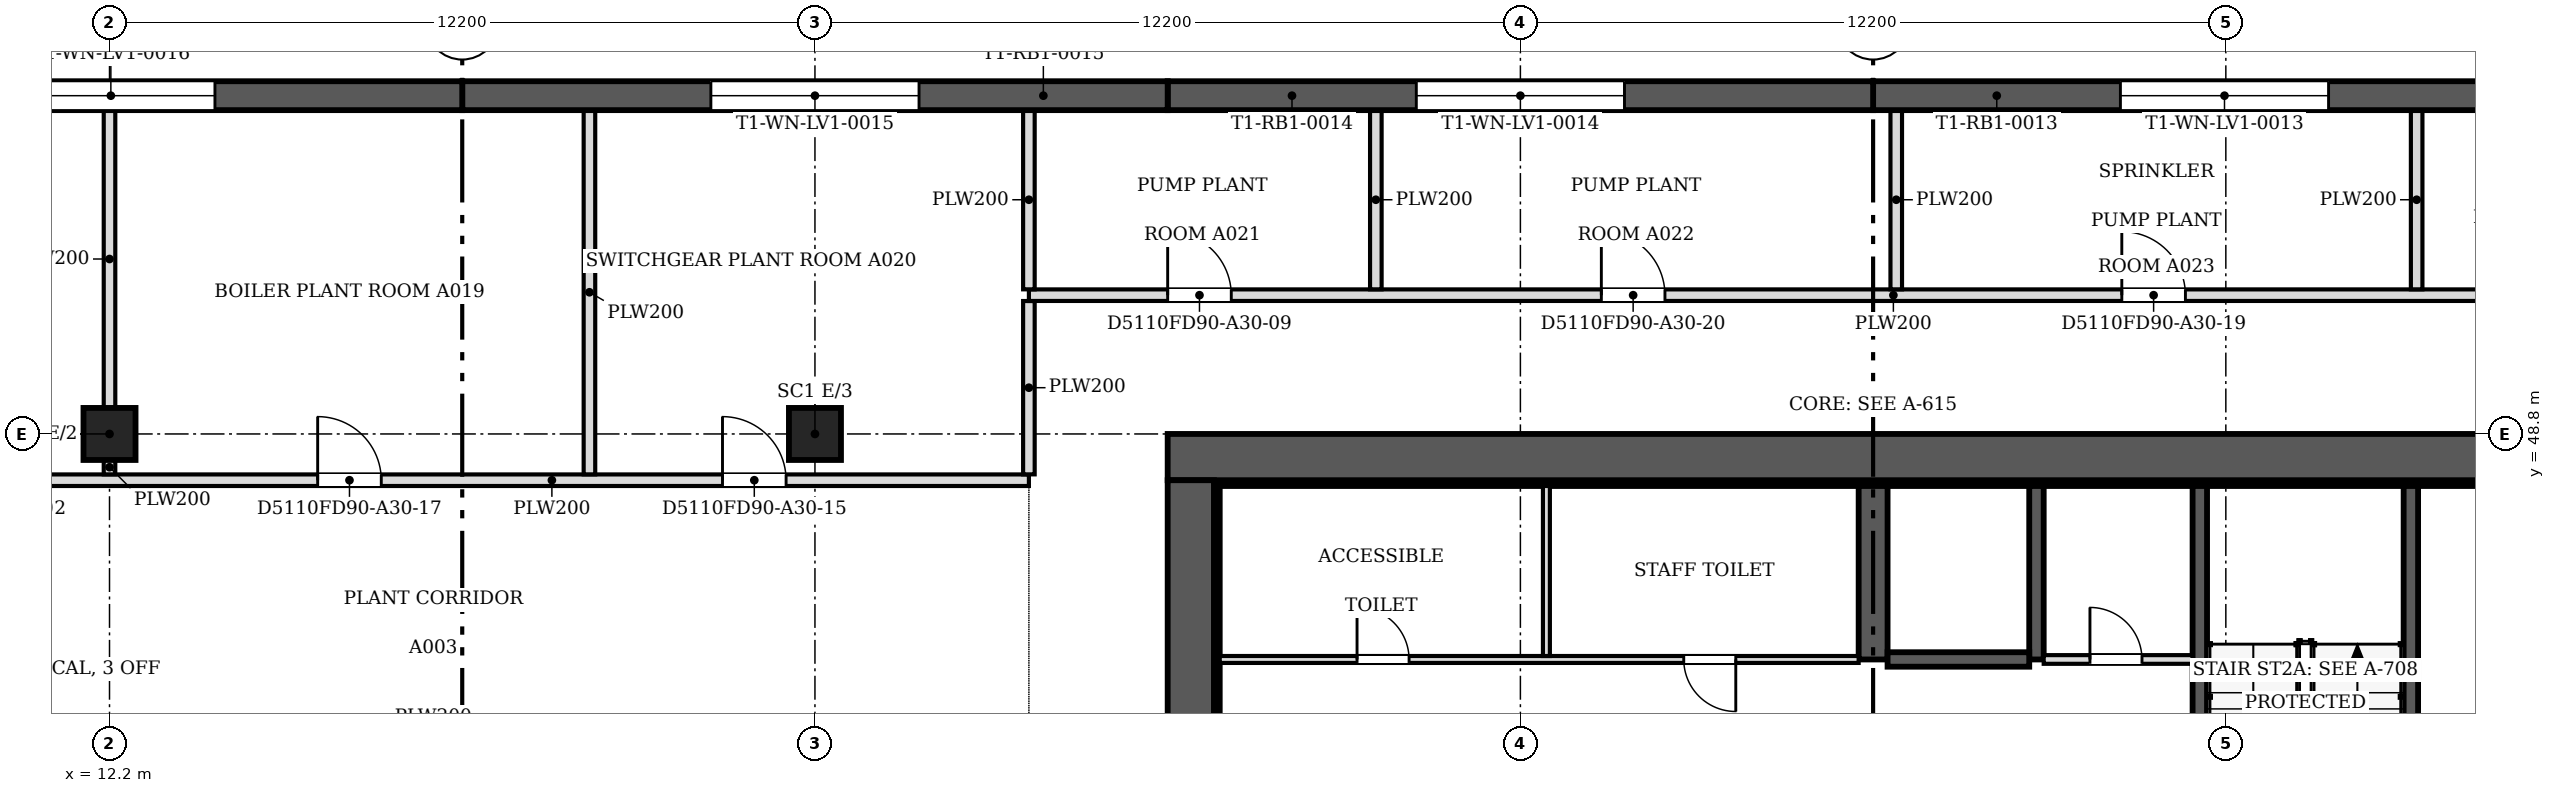
"""IFC4 building model, lengths in metres.
Left out: names, types, materials, properties, quantities, classifications, styles, units other than length and angle.
Written with IfcOpenShell. Run it as: python <this file> out.ifc"""

import sys

from ifc_helpers import new_model, si_unit, direction, frame, frame_2d, origin, origin_2d, place, context, subcontext, project, spatial, polyline, rectangle, outline, extrude, faceted_brep, source, transform, mapped, element, fill, save


model = new_model("IFC4")
c1 = context("Model", 3, precision=1e-05, world=origin(), true_north=direction((0.0, 1.0)))
c2 = subcontext(c1, "Body", "Model", "MODEL_VIEW")
j1 = project(units=[si_unit("LENGTHUNIT", "METRE"), si_unit("PLANEANGLEUNIT", "RADIAN")], contexts=[c1])
p1 = place(None, origin())
s1 = spatial("IfcSite", under=j1, at=p1, CompositionType="ELEMENT")
p2 = place(p1, origin())
s2 = spatial("IfcBuilding", under=s1, at=p2, CompositionType="ELEMENT")
p3 = place(p2, frame((0.0, 0.0, 63.8)))
s3 = spatial("IfcBuildingStorey", under=s2, at=p3, CompositionType="ELEMENT", Elevation=63.8)
for number, where, z_axis, x_axis in (
    (1, (12.2, 48.8, 0.0), (0.0, 0.0, 1.0), (1.0, 0.0, 0.0)),
    (2, (24.4, 48.8, 0.0), (0.0, 0.0, 1.0), (1.0, 0.0, 0.0)),
):
    element("IfcColumn", number, at=place(p3, frame(where, z_axis=z_axis, x_axis=x_axis)), inside=s3, PredefinedType="COLUMN", context=c2, shape_type="SweptSolid", body=[
        extrude(rectangle(XDim=0.9, YDim=0.9, at=origin_2d()), origin(), (0.0, 0.0, 1.0), 4.6),
    ])
m1 = source(origin(), c2, "Body", "Brep", [
    faceted_brep([(0.0, -0.25, 0.0), (12.154, -0.25, 0.0), (12.154, -0.25, 4.8), (0.0, -0.25, 4.8), (0.047, 0.25, 4.8), (12.154, 0.25, 4.8), (12.154, 0.25, 0.0), (0.047, 0.25, 0.0), (0.0, 0.0, 0.0), (0.0, 0.0, 4.8)], [[[0, 1, 2, 3]], [[4, 5, 6, 7]], [[7, 6, 1, 0, 8]], [[5, 4, 9, 3, 2]], [[8, 0, 3, 9]], [[7, 8, 9, 4]], [[1, 6, 5, 2]]]),
])
p4 = place(p3, frame((54.854, 54.65, 0.0), z_axis=(0.0, 0.0, 1.0), x_axis=(-1.0, 0.0, 0.0)))
e3 = element("IfcWall", 3, at=p4, inside=s3, PredefinedType="SOLIDWALL", context=c2, shape_type="MappedRepresentation", body=[
    mapped(m1, transform((0.0, 0.0, 0.0), scale=1.0)),
])
m2 = source(origin(), c2, "Body", "SweptSolid", [
    extrude(outline(polyline([(4.277, 0.8), (7.877, 0.8), (7.877, 4.0), (4.277, 4.0), (4.277, 0.8)])), frame((0.0, 0.26, 0.0), z_axis=(0.0, -1.0, 0.0), x_axis=(1.0, 0.0, 0.0)), (0.0, 0.0, 1.0), 0.52),
])
p5 = place(p4, origin())
e4 = element("IfcOpeningElement", 4, at=p5, cuts=e3, PredefinedType="OPENING", context=c2, shape_type="MappedRepresentation", body=[
    mapped(m2, transform((0.0, 0.0, 0.0), scale=1.0)),
])
m3 = source(origin(), c2, "Body", "SweptSolid", [
    extrude(outline(polyline([(0.0, 0.0), (12.2, 0.0), (12.2, 4.8), (0.0, 4.8), (0.0, 0.0)])), frame((0.0, 0.25, 0.0), z_axis=(0.0, -1.0, 0.0), x_axis=(1.0, 0.0, 0.0)), (0.0, 0.0, 1.0), 0.5),
])
p6 = place(p3, frame((42.7, 54.65, 0.0), z_axis=(0.0, 0.0, 1.0), x_axis=(-1.0, 0.0, 0.0)))
e5 = element("IfcWall", 5, at=p6, inside=s3, PredefinedType="SOLIDWALL", context=c2, shape_type="MappedRepresentation", body=[
    mapped(m3, transform((0.0, 0.0, 0.0), scale=1.0)),
])
m4 = source(origin(), c2, "Body", "SweptSolid", [
    extrude(outline(polyline([(4.3, 0.8), (7.9, 0.8), (7.9, 4.0), (4.3, 4.0), (4.3, 0.8)])), frame((0.0, 0.26, 0.0), z_axis=(0.0, -1.0, 0.0), x_axis=(1.0, 0.0, 0.0)), (0.0, 0.0, 1.0), 0.52),
])
p7 = place(p6, origin())
e6 = element("IfcOpeningElement", 6, at=p7, cuts=e5, PredefinedType="OPENING", context=c2, shape_type="MappedRepresentation", body=[
    mapped(m4, transform((0.0, 0.0, 0.0), scale=1.0)),
])
p8 = place(p3, frame((30.5, 54.65, 0.0), z_axis=(0.0, 0.0, 1.0), x_axis=(-1.0, 0.0, 0.0)))
e7 = element("IfcWall", 7, at=p8, inside=s3, PredefinedType="SOLIDWALL", context=c2, shape_type="MappedRepresentation", body=[
    mapped(m3, transform((0.0, 0.0, 0.0), scale=1.0)),
])
p9 = place(p8, origin())
e8 = element("IfcOpeningElement", 8, at=p9, cuts=e7, PredefinedType="OPENING", context=c2, shape_type="MappedRepresentation", body=[
    mapped(m4, transform((0.0, 0.0, 0.0), scale=1.0)),
])
m5 = source(origin(), c2, "Body", "Brep", [
    faceted_brep([(0.0, -0.25, 0.0), (12.154, -0.25, 0.0), (12.154, -0.25, 4.8), (0.0, -0.25, 4.8), (0.0, 0.25, 4.8), (12.107, 0.25, 4.8), (12.107, 0.25, 0.0), (0.0, 0.25, 0.0), (12.154, -0.0, 0.0), (12.154, -0.0, 4.8)], [[[0, 1, 2, 3]], [[4, 5, 6, 7]], [[7, 6, 8, 1, 0]], [[9, 2, 1, 8]], [[5, 4, 3, 2, 9]], [[4, 7, 0, 3]], [[8, 6, 5, 9]]]),
])
p10 = place(p3, frame((18.3, 54.65, 0.0), z_axis=(0.0, 0.0, 1.0), x_axis=(-1.0, 0.0, 0.0)))
e9 = element("IfcWall", 9, at=p10, inside=s3, PredefinedType="SOLIDWALL", context=c2, shape_type="MappedRepresentation", body=[
    mapped(m5, transform((0.0, 0.0, 0.0), scale=1.0)),
])
p11 = place(p10, origin())
e10 = element("IfcOpeningElement", 10, at=p11, cuts=e9, PredefinedType="OPENING", context=c2, shape_type="MappedRepresentation", body=[
    mapped(m2, transform((0.0, 0.0, 0.0), scale=1.0)),
])
p12 = place(p3, frame((30.9, 25.2, 0.0), z_axis=(0.0, 0.0, 1.0), x_axis=(0.0, 1.0, 0.0)))
e11 = element("IfcWall", 11, at=p12, inside=s3, PredefinedType="SHEAR", context=c2, shape_type="SweptSolid", body=[
    extrude(rectangle(XDim=22.8, YDim=0.8, at=frame_2d((11.4, 0.0))), origin(), (0.0, 0.0, 1.0), 4.8),
])
m6 = source(origin(), c2, "Body", "SweptSolid", [
    extrude(rectangle(XDim=2.1, YDim=2.4, at=frame_2d((1.05, 1.2))), frame((0.0, 0.41, 0.0), z_axis=(0.0, -1.0, 0.0), x_axis=(1.0, 0.0, 0.0)), (0.0, 0.0, 1.0), 0.82),
])
p13 = place(p12, frame((4.6, 0.0, 0.0)))
e12 = element("IfcOpeningElement", 12, at=p13, cuts=e11, PredefinedType="OPENING", context=c2, shape_type="MappedRepresentation", body=[
    mapped(m6, transform((0.0, 0.0, 0.0), scale=1.0)),
])
p14 = place(p12, frame((16.1, 0.0, 0.0)))
e13 = element("IfcOpeningElement", 13, at=p14, cuts=e11, PredefinedType="OPENING", context=c2, shape_type="MappedRepresentation", body=[
    mapped(m6, transform((0.0, 0.0, 0.0), scale=1.0)),
])
p15 = place(p3, frame((30.5, 48.4, 0.0), z_axis=(0.0, 0.0, 1.0), x_axis=(1.0, 0.0, 0.0)))
e14 = element("IfcWall", 14, at=p15, inside=s3, PredefinedType="SHEAR", context=c2, shape_type="SweptSolid", body=[
    extrude(rectangle(XDim=24.4, YDim=0.8, at=frame_2d((12.2, 0.0))), origin(), (0.0, 0.0, 1.0), 4.8),
])
p16 = place(p3, frame((31.3, 47.95, 0.0), z_axis=(0.0, 0.0, 1.0), x_axis=(1.0, 0.0, 0.0)))
e15 = element("IfcWall", 15, at=p16, inside=s3, PredefinedType="SOLIDWALL", context=c2, shape_type="SweptSolid", body=[
    extrude(rectangle(XDim=22.8, YDim=0.1, at=frame_2d((11.4, 0.0))), origin(), (0.0, 0.0, 1.0), 4.8),
])
p17 = place(p3, frame((31.35, 43.4, 0.0), z_axis=(0.0, 0.0, 1.0), x_axis=(0.0, 1.0, 0.0)))
e16 = element("IfcWall", 16, at=p17, inside=s3, PredefinedType="SOLIDWALL", context=c2, shape_type="SweptSolid", body=[
    extrude(rectangle(XDim=4.5, YDim=0.1, at=frame_2d((2.25, 0.0))), origin(), (0.0, 0.0, 1.0), 4.8),
])
p18 = place(p3, frame((42.7, 44.9, 0.0), z_axis=(0.0, 0.0, 1.0), x_axis=(0.0, 1.0, 0.0)))
e17 = element("IfcWall", 17, at=p18, inside=s3, PredefinedType="SHEAR", context=c2, shape_type="SweptSolid", body=[
    extrude(rectangle(XDim=3.0, YDim=0.5, at=frame_2d((1.5, 0.0))), origin(), (0.0, 0.0, 1.0), 4.8),
])
p19 = place(p3, frame((48.35, 47.9, 0.0), z_axis=(0.0, 0.0, 1.0), x_axis=(0.0, -1.0, 0.0)))
e18 = element("IfcWall", 18, at=p19, inside=s3, PredefinedType="SOLIDWALL", context=c2, shape_type="SweptSolid", body=[
    extrude(rectangle(XDim=11.05, YDim=0.25, at=frame_2d((5.525, 0.0))), origin(), (0.0, 0.0, 1.0), 4.8),
])
m7 = source(origin(), c2, "Body", "SweptSolid", [
    extrude(rectangle(XDim=1.2, YDim=2.1, at=frame_2d((0.6, 1.05))), frame((0.0, 0.135, 0.0), z_axis=(0.0, -1.0, 0.0), x_axis=(1.0, 0.0, 0.0)), (0.0, 0.0, 1.0), 0.27),
])
p20 = place(p19, frame((6.625, 0.0, 0.0)))
e19 = element("IfcOpeningElement", 19, at=p20, cuts=e18, PredefinedType="OPENING", context=c2, shape_type="MappedRepresentation", body=[
    mapped(m7, transform((0.0, 0.0, 0.0), scale=1.0)),
])
p21 = place(p3, frame((52.0, 39.925, 0.0), z_axis=(0.0, 0.0, 1.0), x_axis=(0.0, 1.0, 0.0)))
e20 = element("IfcWall", 20, at=p21, inside=s3, PredefinedType="SOLIDWALL", context=c2, shape_type="SweptSolid", body=[
    extrude(rectangle(XDim=7.975, YDim=0.25, at=frame_2d((3.987, 0.0))), origin(), (0.0, 0.0, 1.0), 4.8),
])
p22 = place(p21, frame((0.15, 0.0, 0.0)))
e21 = element("IfcOpeningElement", 21, at=p22, cuts=e20, PredefinedType="OPENING", context=c2, shape_type="MappedRepresentation", body=[
    mapped(m7, transform((0.0, 0.0, 0.0), scale=1.0)),
])
p23 = place(p3, frame((45.525, 44.9, 0.0), z_axis=(0.0, 0.0, 1.0), x_axis=(0.0, 1.0, 0.0)))
e22 = element("IfcWall", 22, at=p23, inside=s3, PredefinedType="SOLIDWALL", context=c2, shape_type="SweptSolid", body=[
    extrude(rectangle(XDim=3.0, YDim=0.25, at=frame_2d((1.5, 0.0))), origin(), (0.0, 0.0, 1.0), 4.8),
])
p24 = place(p3, frame((42.95, 44.9, 0.0), z_axis=(0.0, 0.0, 1.0), x_axis=(1.0, 0.0, 0.0)))
e23 = element("IfcWall", 23, at=p24, inside=s3, PredefinedType="SOLIDWALL", context=c2, shape_type="SweptSolid", body=[
    extrude(rectangle(XDim=2.45, YDim=0.25, at=frame_2d((1.225, 0.0))), origin(), (0.0, 0.0, 1.0), 4.8),
])
p25 = place(p3, frame((31.4, 44.9, 0.0), z_axis=(0.0, 0.0, 1.0), x_axis=(1.0, 0.0, 0.0)))
e24 = element("IfcWall", 24, at=p25, inside=s3, PredefinedType="PARTITIONING", context=c2, shape_type="SweptSolid", body=[
    extrude(rectangle(XDim=11.05, YDim=0.12, at=frame_2d((5.525, 0.0))), origin(), (0.0, 0.0, 1.0), 4.6),
])
m8 = source(origin(), c2, "Body", "SweptSolid", [
    extrude(rectangle(XDim=0.9, YDim=2.1, at=frame_2d((0.45, 1.05))), frame((0.0, 0.07, 0.0), z_axis=(0.0, -1.0, 0.0), x_axis=(1.0, 0.0, 0.0)), (0.0, 0.0, 1.0), 0.14),
])
p26 = place(p25, frame((2.375, 0.0, 0.0)))
e25 = element("IfcOpeningElement", 25, at=p26, cuts=e24, PredefinedType="OPENING", context=c2, shape_type="MappedRepresentation", body=[
    mapped(m8, transform((0.0, 0.0, 0.0), scale=1.0)),
])
p27 = place(p25, frame((8.025, 0.0, 0.0)))
e26 = element("IfcOpeningElement", 26, at=p27, cuts=e24, PredefinedType="OPENING", context=c2, shape_type="MappedRepresentation", body=[
    mapped(m8, transform((0.0, 0.0, 0.0), scale=1.0)),
])
p28 = place(p3, frame((37.05, 44.96, 0.0), z_axis=(0.0, 0.0, 1.0), x_axis=(0.0, 1.0, 0.0)))
e27 = element("IfcWall", 27, at=p28, inside=s3, PredefinedType="PARTITIONING", context=c2, shape_type="SweptSolid", body=[
    extrude(rectangle(XDim=2.94, YDim=0.12, at=frame_2d((1.47, 0.0))), origin(), (0.0, 0.0, 1.0), 4.6),
])
p29 = place(p3, frame((45.65, 44.9, 0.0), z_axis=(0.0, 0.0, 1.0), x_axis=(1.0, 0.0, 0.0)))
e28 = element("IfcWall", 28, at=p29, inside=s3, PredefinedType="PARTITIONING", context=c2, shape_type="SweptSolid", body=[
    extrude(rectangle(XDim=2.575, YDim=0.15, at=frame_2d((1.288, 0.0))), origin(), (0.0, 0.0, 1.0), 4.6),
])
m9 = source(origin(), c2, "Body", "SweptSolid", [
    extrude(rectangle(XDim=0.9, YDim=2.1, at=frame_2d((0.45, 1.05))), frame((0.0, 0.085, 0.0), z_axis=(0.0, -1.0, 0.0), x_axis=(1.0, 0.0, 0.0)), (0.0, 0.0, 1.0), 0.17),
])
p30 = place(p29, frame((0.8, 0.0, 0.0)))
e29 = element("IfcOpeningElement", 29, at=p30, cuts=e28, PredefinedType="OPENING", context=c2, shape_type="MappedRepresentation", body=[
    mapped(m9, transform((0.0, 0.0, 0.0), scale=1.0)),
])
p31 = place(p3, frame((7.5, 48.0, 0.0), z_axis=(0.0, 0.0, 1.0), x_axis=(1.0, 0.0, 0.0)))
e30 = element("IfcWall", 30, at=p31, inside=s3, PredefinedType="PARTITIONING", context=c2, shape_type="SweptSolid", body=[
    extrude(rectangle(XDim=20.6, YDim=0.2, at=frame_2d((10.3, 0.0))), origin(), (0.0, 0.0, 1.0), 4.067),
])
m10 = source(origin(), c2, "Body", "SweptSolid", [
    extrude(rectangle(XDim=1.1, YDim=2.1, at=frame_2d((0.55, 1.05))), frame((0.0, 0.11, 0.0), z_axis=(0.0, -1.0, 0.0), x_axis=(1.0, 0.0, 0.0)), (0.0, 0.0, 1.0), 0.22),
])
p32 = place(p31, frame((1.8, 0.0, 0.0)))
e31 = element("IfcOpeningElement", 31, at=p32, cuts=e30, PredefinedType="OPENING", context=c2, shape_type="MappedRepresentation", body=[
    mapped(m10, transform((0.0, 0.0, 0.0), scale=1.0)),
])
p33 = place(p31, frame((15.301, 0.0, 0.0)))
e32 = element("IfcOpeningElement", 32, at=p33, cuts=e30, PredefinedType="OPENING", context=c2, shape_type="MappedRepresentation", body=[
    mapped(m10, transform((0.0, 0.0, 0.0), scale=1.0)),
])
p34 = place(p31, frame((8.3, 0.0, 0.0)))
e33 = element("IfcOpeningElement", 33, at=p34, cuts=e30, PredefinedType="OPENING", context=c2, shape_type="MappedRepresentation", body=[
    mapped(m10, transform((0.0, 0.0, 0.0), scale=1.0)),
])
p35 = place(p3, frame((12.2, 48.101, 0.0), z_axis=(0.0, 0.0, 1.0), x_axis=(0.0, 1.0, 0.0)))
e34 = element("IfcWall", 34, at=p35, inside=s3, PredefinedType="PARTITIONING", context=c2, shape_type="SweptSolid", body=[
    extrude(rectangle(XDim=0.248, YDim=0.2, at=frame_2d((0.124, 0.0))), origin(), (0.0, 0.0, 1.0), 4.067),
])
p36 = place(p3, frame((20.5, 48.101, 0.0), z_axis=(0.0, 0.0, 1.0), x_axis=(0.0, 1.0, 0.0)))
e35 = element("IfcWall", 35, at=p36, inside=s3, PredefinedType="PARTITIONING", context=c2, shape_type="SweptSolid", body=[
    extrude(rectangle(XDim=6.299, YDim=0.2, at=frame_2d((3.149, 0.0))), origin(), (0.0, 0.0, 1.0), 4.067),
])
p37 = place(p3, frame((28.1, 48.101, 0.0), z_axis=(0.0, 0.0, 1.0), x_axis=(0.0, 1.0, 0.0)))
e36 = element("IfcWall", 36, at=p37, inside=s3, PredefinedType="PARTITIONING", context=c2, shape_type="SweptSolid", body=[
    extrude(rectangle(XDim=2.998, YDim=0.2, at=frame_2d((1.499, 0.0))), origin(), (0.0, 0.0, 1.0), 4.067),
])
p38 = place(p3, frame((12.2, 49.251, 0.0), z_axis=(0.0, 0.0, 1.0), x_axis=(0.0, 1.0, 0.0)))
e37 = element("IfcWall", 37, at=p38, inside=s3, PredefinedType="PARTITIONING", context=c2, shape_type="SweptSolid", body=[
    extrude(rectangle(XDim=5.149, YDim=0.2, at=frame_2d((2.574, 0.0))), origin(), (0.0, 0.0, 1.0), 4.067),
])
p39 = place(p3, frame((28.1, 51.2, 0.0), z_axis=(0.0, 0.0, 1.0), x_axis=(1.0, 0.0, 0.0)))
e38 = element("IfcWall", 38, at=p39, inside=s3, PredefinedType="PARTITIONING", context=c2, shape_type="SweptSolid", body=[
    extrude(rectangle(XDim=31.413, YDim=0.2, at=frame_2d((15.707, 0.0))), origin(), (0.0, 0.0, 1.0), 4.067),
])
p40 = place(p39, frame((2.4, 0.0, 0.0)))
e39 = element("IfcOpeningElement", 39, at=p40, cuts=e38, PredefinedType="OPENING", context=c2, shape_type="MappedRepresentation", body=[
    mapped(m10, transform((0.0, 0.0, 0.0), scale=1.0)),
])
p41 = place(p39, frame((27.201, 0.0, 0.0)))
e40 = element("IfcOpeningElement", 40, at=p41, cuts=e38, PredefinedType="OPENING", context=c2, shape_type="MappedRepresentation", body=[
    mapped(m10, transform((0.0, 0.0, 0.0), scale=1.0)),
])
p42 = place(p39, frame((18.901, 0.0, 0.0)))
e41 = element("IfcOpeningElement", 41, at=p42, cuts=e38, PredefinedType="OPENING", context=c2, shape_type="MappedRepresentation", body=[
    mapped(m10, transform((0.0, 0.0, 0.0), scale=1.0)),
])
p43 = place(p39, frame((9.9, 0.0, 0.0)))
e42 = element("IfcOpeningElement", 42, at=p43, cuts=e38, PredefinedType="OPENING", context=c2, shape_type="MappedRepresentation", body=[
    mapped(m10, transform((0.0, 0.0, 0.0), scale=1.0)),
])
for number, where, z_axis, x_axis in (
    (43, (28.1, 51.301, 0.0), (0.0, 0.0, 1.0), (0.0, 1.0, 0.0)),
    (44, (34.1, 51.301, 0.0), (0.0, 0.0, 1.0), (0.0, 1.0, 0.0)),
    (45, (43.1, 51.301, 0.0), (0.0, 0.0, 1.0), (0.0, 1.0, 0.0)),
    (46, (52.1, 51.301, 0.0), (0.0, 0.0, 1.0), (0.0, 1.0, 0.0)),
):
    element("IfcWall", number, at=place(p3, frame(where, z_axis=z_axis, x_axis=x_axis)), inside=s3, PredefinedType="PARTITIONING", context=c2, shape_type="SweptSolid", body=[
        extrude(rectangle(XDim=3.099, YDim=0.2, at=frame_2d((1.549, 0.0))), origin(), (0.0, 0.0, 1.0), 4.067),
    ])
m11 = source(origin(), c2, "Body", "SweptSolid", [
    extrude(outline(polyline([(4.277, 0.8), (7.877, 0.8), (7.877, 4.0), (4.277, 4.0), (4.277, 0.8)])), frame((0.0, 0.03, 0.0), z_axis=(0.0, -1.0, 0.0), x_axis=(1.0, 0.0, 0.0)), (0.0, 0.0, 1.0), 0.06),
])
p44 = place(p5, origin())
e47 = element("IfcWindow", 47, at=p44, inside=s3, PartitioningType="USERDEFINED", PredefinedType="WINDOW", context=c2, shape_type="MappedRepresentation", body=[
    mapped(m11, transform((0.0, 0.0, 0.0), scale=1.0)),
])
fill(e4, e47)
m12 = source(origin(), c2, "Body", "SweptSolid", [
    extrude(outline(polyline([(4.3, 0.8), (7.9, 0.8), (7.9, 4.0), (4.3, 4.0), (4.3, 0.8)])), frame((0.0, 0.03, 0.0), z_axis=(0.0, -1.0, 0.0), x_axis=(1.0, 0.0, 0.0)), (0.0, 0.0, 1.0), 0.06),
])
p45 = place(p7, origin())
e48 = element("IfcWindow", 48, at=p45, inside=s3, PartitioningType="USERDEFINED", PredefinedType="WINDOW", context=c2, shape_type="MappedRepresentation", body=[
    mapped(m12, transform((0.0, 0.0, 0.0), scale=1.0)),
])
fill(e6, e48)
p46 = place(p9, origin())
e49 = element("IfcWindow", 49, at=p46, inside=s3, PartitioningType="USERDEFINED", PredefinedType="WINDOW", context=c2, shape_type="MappedRepresentation", body=[
    mapped(m12, transform((0.0, 0.0, 0.0), scale=1.0)),
])
fill(e8, e49)
p47 = place(p11, origin())
e50 = element("IfcWindow", 50, at=p47, inside=s3, PartitioningType="USERDEFINED", PredefinedType="WINDOW", context=c2, shape_type="MappedRepresentation", body=[
    mapped(m11, transform((0.0, 0.0, 0.0), scale=1.0)),
])
fill(e10, e50)
m13 = source(origin(), c2, "Body", "SweptSolid", [
    extrude(rectangle(XDim=0.9, YDim=2.1, at=frame_2d((0.45, 1.05))), frame((0.0, 0.025, 0.0), z_axis=(0.0, -1.0, 0.0), x_axis=(1.0, 0.0, 0.0)), (0.0, 0.0, 1.0), 0.05),
])
p48 = place(p26, origin())
e51 = element("IfcDoor", 51, at=p48, inside=s3, OperationType="SINGLE_SWING_LEFT", PredefinedType="DOOR", context=c2, shape_type="MappedRepresentation", body=[
    mapped(m13, transform((0.0, 0.0, 0.0), scale=1.0)),
])
fill(e25, e51)
p49 = place(p27, origin())
e52 = element("IfcDoor", 52, at=p49, inside=s3, OperationType="SINGLE_SWING_RIGHT", PredefinedType="DOOR", context=c2, shape_type="MappedRepresentation", body=[
    mapped(m13, transform((0.0, 0.0, 0.0), scale=1.0)),
])
fill(e26, e52)
p50 = place(p30, origin())
e53 = element("IfcDoor", 53, at=p50, inside=s3, OperationType="SINGLE_SWING_LEFT", PredefinedType="DOOR", context=c2, shape_type="MappedRepresentation", body=[
    mapped(m13, transform((0.0, 0.0, 0.0), scale=1.0)),
])
fill(e29, e53)
m14 = source(origin(), c2, "Body", "SweptSolid", [
    extrude(rectangle(XDim=1.1, YDim=2.1, at=frame_2d((0.55, 1.05))), frame((0.0, 0.025, 0.0), z_axis=(0.0, -1.0, 0.0), x_axis=(1.0, 0.0, 0.0)), (0.0, 0.0, 1.0), 0.05),
])
p51 = place(p40, origin())
e54 = element("IfcDoor", 54, at=p51, inside=s3, OperationType="SINGLE_SWING_LEFT", PredefinedType="DOOR", context=c2, shape_type="MappedRepresentation", body=[
    mapped(m14, transform((0.0, 0.0, 0.0), scale=1.0)),
])
fill(e39, e54)
p52 = place(p33, origin())
e55 = element("IfcDoor", 55, at=p52, inside=s3, OperationType="SINGLE_SWING_LEFT", PredefinedType="DOOR", context=c2, shape_type="MappedRepresentation", body=[
    mapped(m14, transform((0.0, 0.0, 0.0), scale=1.0)),
])
fill(e32, e55)
p53 = place(p34, origin())
e56 = element("IfcDoor", 56, at=p53, inside=s3, OperationType="SINGLE_SWING_LEFT", PredefinedType="DOOR", context=c2, shape_type="MappedRepresentation", body=[
    mapped(m14, transform((0.0, 0.0, 0.0), scale=1.0)),
])
fill(e33, e56)
p54 = place(p42, origin())
e57 = element("IfcDoor", 57, at=p54, inside=s3, OperationType="SINGLE_SWING_LEFT", PredefinedType="DOOR", context=c2, shape_type="MappedRepresentation", body=[
    mapped(m14, transform((0.0, 0.0, 0.0), scale=1.0)),
])
fill(e41, e57)
p55 = place(p43, origin())
e58 = element("IfcDoor", 58, at=p55, inside=s3, OperationType="SINGLE_SWING_LEFT", PredefinedType="DOOR", context=c2, shape_type="MappedRepresentation", body=[
    mapped(m14, transform((0.0, 0.0, 0.0), scale=1.0)),
])
fill(e42, e58)
save(model, sys.argv[1])
